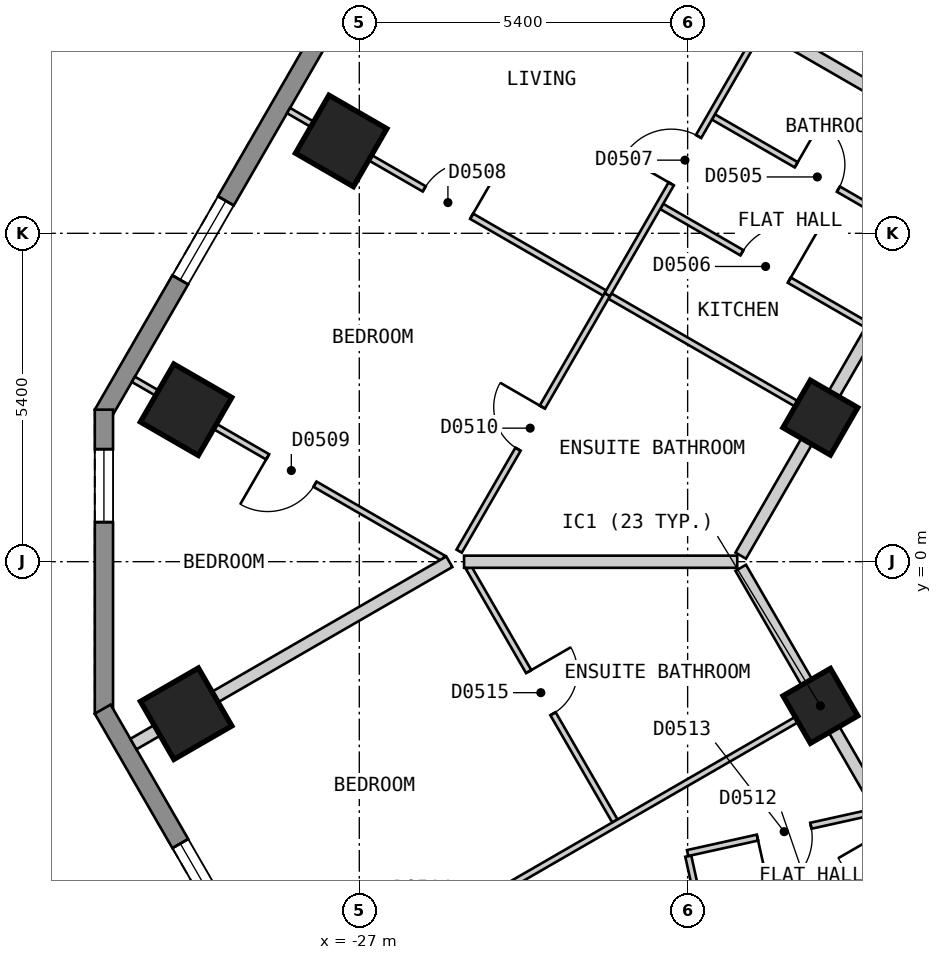
"""IFC4 building model, lengths in metres.
Left out: names, types, materials, properties, quantities, classifications, styles, units other than length and angle.
Written with IfcOpenShell. Run it as: python <this file> out.ifc"""

import sys

from ifc_helpers import new_model, si_unit, direction, frame, frame_2d, origin, origin_2d, place, context, subcontext, project, spatial, polyline, rectangle, outline, extrude, element, fill, save


model = new_model("IFC4")
c1 = context("Model", 3, precision=1e-05, world=origin(), true_north=direction((0.0, 1.0)))
c2 = subcontext(c1, "Body", "Model", "MODEL_VIEW")
j1 = project(units=[si_unit("LENGTHUNIT", "METRE"), si_unit("PLANEANGLEUNIT", "RADIAN")], contexts=[c1])
p1 = place(None, origin())
s1 = spatial("IfcSite", under=j1, at=p1, CompositionType="ELEMENT")
p2 = place(p1, origin())
s2 = spatial("IfcBuilding", under=s1, at=p2, CompositionType="ELEMENT")
p3 = place(p2, frame((0.0, 0.0, 50.4)))
s3 = spatial("IfcBuildingStorey", under=s2, at=p3, CompositionType="ELEMENT", Elevation=50.4)
for number, where, z_axis, x_axis in (
    (1, (-27.298, 6.919, 0.0), (0.0, 0.0, 1.0), (-0.5, -0.866, 0.0)),
    (2, (-29.849, 2.499, 0.0), (0.0, 0.0, 1.0), (-0.5, -0.866, 0.0)),
    (3, (-29.848, -2.5, 0.0), (0.0, 0.0, 1.0), (0.5, -0.866, 0.0)),
):
    element("IfcColumn", number, at=place(p3, frame(where, z_axis=z_axis, x_axis=x_axis)), inside=s3, PredefinedType="COLUMN", context=c2, shape_type="SweptSolid", body=[
        extrude(rectangle(XDim=1.1, YDim=1.1, at=origin_2d()), origin(), (0.0, 0.0, 1.0), 3.0),
    ])
for number, where, z_axis, x_axis in (
    (4, (-19.416, -2.371, 0.0), (0.0, 0.0, 1.0), (0.5, -0.866, 0.0)),
    (5, (-19.417, 2.369, 0.0), (0.0, 0.0, 1.0), (-0.5, -0.866, 0.0)),
):
    element("IfcColumn", number, at=place(p3, frame(where, z_axis=z_axis, x_axis=x_axis)), inside=s3, PredefinedType="COLUMN", context=c2, shape_type="SweptSolid", body=[
        extrude(rectangle(XDim=0.9, YDim=0.9, at=origin_2d()), origin(), (0.0, 0.0, 1.0), 3.0),
    ])
p4 = place(p3, frame((-17.71, 25.825, 0.0), z_axis=(0.0, 0.0, 1.0), x_axis=(-0.500001938803, -0.866024284413, 0.0)))
e6 = element("IfcWall", 6, at=p4, inside=s3, PredefinedType="SOLIDWALL", context=c2, shape_type="SweptSolid", body=[
    extrude(outline(polyline([(0.0, -0.15), (27.02, -0.15), (26.94, 0.15), (0.08, 0.15), (0.0, -0.15)])), origin(), (0.0, 0.0, 1.0), 2.7),
])
p5 = place(p4, frame((2.553, 0.0, 0.15)))
e7 = element("IfcOpeningElement", 7, at=p5, cuts=e6, PredefinedType="OPENING", context=c2, shape_type="SweptSolid", body=[
    extrude(rectangle(XDim=1.5, YDim=2.1, at=frame_2d((0.75, 1.05))), frame((0.0, 0.16, 0.0), z_axis=(0.0, -1.0, 0.0), x_axis=(1.0, 0.0, 0.0)), (0.0, 0.0, 1.0), 0.32),
])
p6 = place(p4, frame((7.658, 0.0, 0.15)))
e8 = element("IfcOpeningElement", 8, at=p6, cuts=e6, PredefinedType="OPENING", context=c2, shape_type="SweptSolid", body=[
    extrude(rectangle(XDim=1.5, YDim=2.1, at=frame_2d((0.75, 1.05))), frame((0.0, 0.16, 0.0), z_axis=(0.0, -1.0, 0.0), x_axis=(1.0, 0.0, 0.0)), (0.0, 0.0, 1.0), 0.32),
])
p7 = place(p4, frame((12.761, 0.0, 0.15)))
e9 = element("IfcOpeningElement", 9, at=p7, cuts=e6, PredefinedType="OPENING", context=c2, shape_type="SweptSolid", body=[
    extrude(rectangle(XDim=1.5, YDim=2.1, at=frame_2d((0.75, 1.05))), frame((0.0, 0.16, 0.0), z_axis=(0.0, -1.0, 0.0), x_axis=(1.0, 0.0, 0.0)), (0.0, 0.0, 1.0), 0.32),
])
p8 = place(p4, frame((17.865, 0.0, 0.15)))
e10 = element("IfcOpeningElement", 10, at=p8, cuts=e6, PredefinedType="OPENING", context=c2, shape_type="SweptSolid", body=[
    extrude(rectangle(XDim=1.5, YDim=2.1, at=frame_2d((0.75, 1.05))), frame((0.0, 0.16, 0.0), z_axis=(0.0, -1.0, 0.0), x_axis=(1.0, 0.0, 0.0)), (0.0, 0.0, 1.0), 0.32),
])
p9 = place(p4, frame((22.969, 0.0, 0.15)))
e11 = element("IfcOpeningElement", 11, at=p9, cuts=e6, PredefinedType="OPENING", context=c2, shape_type="SweptSolid", body=[
    extrude(rectangle(XDim=1.5, YDim=2.1, at=frame_2d((0.75, 1.05))), frame((0.0, 0.16, 0.0), z_axis=(0.0, -1.0, 0.0), x_axis=(1.0, 0.0, 0.0)), (0.0, 0.0, 1.0), 0.32),
])
p10 = place(p3, frame((-31.2, 2.5, 0.0), z_axis=(0.0, 0.0, 1.0), x_axis=(0.0, -1.0, 0.0)))
e12 = element("IfcWall", 12, at=p10, inside=s3, PredefinedType="SOLIDWALL", context=c2, shape_type="SweptSolid", body=[
    extrude(outline(polyline([(0.0, -0.15), (5.0, -0.15), (4.92, 0.15), (0.08, 0.15), (0.0, -0.15)])), origin(), (0.0, 0.0, 1.0), 2.7),
])
p11 = place(p10, frame((0.65, 0.0, 0.15)))
e13 = element("IfcOpeningElement", 13, at=p11, cuts=e12, PredefinedType="OPENING", context=c2, shape_type="SweptSolid", body=[
    extrude(rectangle(XDim=1.2, YDim=2.1, at=frame_2d((0.6, 1.05))), frame((0.0, 0.16, 0.0), z_axis=(0.0, -1.0, 0.0), x_axis=(1.0, 0.0, 0.0)), (0.0, 0.0, 1.0), 0.32),
])
p12 = place(p3, frame((-31.22, -2.425, 0.0), z_axis=(0.0, 0.0, 1.0), x_axis=(0.500001938803, -0.866024284413, 0.0)))
e14 = element("IfcWall", 14, at=p12, inside=s3, PredefinedType="SOLIDWALL", context=c2, shape_type="SweptSolid", body=[
    extrude(outline(polyline([(0.0, -0.15), (27.02, -0.15), (26.94, 0.15), (0.08, 0.15), (0.0, -0.15)])), origin(), (0.0, 0.0, 1.0), 2.7),
])
p13 = place(p12, frame((2.553, 0.0, 0.15)))
e15 = element("IfcOpeningElement", 15, at=p13, cuts=e14, PredefinedType="OPENING", context=c2, shape_type="SweptSolid", body=[
    extrude(rectangle(XDim=1.5, YDim=2.1, at=frame_2d((0.75, 1.05))), frame((0.0, 0.16, 0.0), z_axis=(0.0, -1.0, 0.0), x_axis=(1.0, 0.0, 0.0)), (0.0, 0.0, 1.0), 0.32),
])
p14 = place(p12, frame((7.657, 0.0, 0.15)))
e16 = element("IfcOpeningElement", 16, at=p14, cuts=e14, PredefinedType="OPENING", context=c2, shape_type="SweptSolid", body=[
    extrude(rectangle(XDim=1.5, YDim=2.1, at=frame_2d((0.75, 1.05))), frame((0.0, 0.16, 0.0), z_axis=(0.0, -1.0, 0.0), x_axis=(1.0, 0.0, 0.0)), (0.0, 0.0, 1.0), 0.32),
])
p15 = place(p12, frame((12.761, 0.0, 0.15)))
e17 = element("IfcOpeningElement", 17, at=p15, cuts=e14, PredefinedType="OPENING", context=c2, shape_type="SweptSolid", body=[
    extrude(rectangle(XDim=1.5, YDim=2.1, at=frame_2d((0.75, 1.05))), frame((0.0, 0.16, 0.0), z_axis=(0.0, -1.0, 0.0), x_axis=(1.0, 0.0, 0.0)), (0.0, 0.0, 1.0), 0.32),
])
p16 = place(p12, frame((17.865, 0.0, 0.15)))
e18 = element("IfcOpeningElement", 18, at=p16, cuts=e14, PredefinedType="OPENING", context=c2, shape_type="SweptSolid", body=[
    extrude(rectangle(XDim=1.5, YDim=2.1, at=frame_2d((0.75, 1.05))), frame((0.0, 0.16, 0.0), z_axis=(0.0, -1.0, 0.0), x_axis=(1.0, 0.0, 0.0)), (0.0, 0.0, 1.0), 0.32),
])
p17 = place(p12, frame((22.969, 0.0, 0.15)))
e19 = element("IfcOpeningElement", 19, at=p17, cuts=e14, PredefinedType="OPENING", context=c2, shape_type="SweptSolid", body=[
    extrude(rectangle(XDim=1.5, YDim=2.1, at=frame_2d((0.75, 1.05))), frame((0.0, 0.16, 0.0), z_axis=(0.0, -1.0, 0.0), x_axis=(1.0, 0.0, 0.0)), (0.0, 0.0, 1.0), 0.32),
])
p18 = place(p3, frame((-20.727, -0.101, 0.0), z_axis=(0.0, 0.0, 1.0), x_axis=(0.500065652488, -0.865987495984, 0.0)))
e20 = element("IfcWall", 20, at=p18, inside=s3, PredefinedType="PARTITIONING", context=c2, shape_type="SweptSolid", body=[
    extrude(rectangle(XDim=7.389, YDim=0.2, at=frame_2d((3.695, 0.0))), origin(), (0.0, 0.0, 1.0), 2.7),
])
p19 = place(p18, frame((4.937, 0.0, 0.0)))
e21 = element("IfcOpeningElement", 21, at=p19, cuts=e20, PredefinedType="OPENING", context=c2, shape_type="SweptSolid", body=[
    extrude(rectangle(XDim=1.0, YDim=2.1, at=frame_2d((0.5, 1.05))), frame((0.0, 0.11, 0.0), z_axis=(0.0, -1.0, 0.0), x_axis=(1.0, 0.0, 0.0)), (0.0, 0.0, 1.0), 0.22),
])
p20 = place(p3, frame((-20.727, 0.099, 0.0), z_axis=(0.0, 0.0, 1.0), x_axis=(0.499993204491, 0.866029327138, 0.0)))
e22 = element("IfcWall", 22, at=p20, inside=s3, PredefinedType="PARTITIONING", context=c2, shape_type="SweptSolid", body=[
    extrude(rectangle(XDim=20.554, YDim=0.2, at=frame_2d((10.277, 0.0))), origin(), (0.0, 0.0, 1.0), 2.7),
])
p21 = place(p20, frame((9.776, 0.0, 0.0)))
e23 = element("IfcOpeningElement", 23, at=p21, cuts=e22, PredefinedType="OPENING", context=c2, shape_type="SweptSolid", body=[
    extrude(rectangle(XDim=1.0, YDim=2.1, at=frame_2d((0.5, 1.05))), frame((0.0, 0.11, 0.0), z_axis=(0.0, -1.0, 0.0), x_axis=(1.0, 0.0, 0.0)), (0.0, 0.0, 1.0), 0.22),
])
p22 = place(p20, frame((4.673, 0.0, 0.0)))
e24 = element("IfcOpeningElement", 24, at=p22, cuts=e22, PredefinedType="OPENING", context=c2, shape_type="SweptSolid", body=[
    extrude(rectangle(XDim=1.0, YDim=2.1, at=frame_2d((0.5, 1.05))), frame((0.0, 0.11, 0.0), z_axis=(0.0, -1.0, 0.0), x_axis=(1.0, 0.0, 0.0)), (0.0, 0.0, 1.0), 0.22),
])
p23 = place(p20, frame((14.88, 0.0, 0.0)))
e25 = element("IfcOpeningElement", 25, at=p23, cuts=e22, PredefinedType="OPENING", context=c2, shape_type="SweptSolid", body=[
    extrude(rectangle(XDim=1.0, YDim=2.1, at=frame_2d((0.5, 1.05))), frame((0.0, 0.11, 0.0), z_axis=(0.0, -1.0, 0.0), x_axis=(1.0, 0.0, 0.0)), (0.0, 0.0, 1.0), 0.22),
])
p24 = place(p3, frame((-25.2, -0.101, 0.0), z_axis=(0.0, 0.0, 1.0), x_axis=(0.500099052605, -0.865968208183, 0.0)))
e26 = element("IfcWall", 26, at=p24, inside=s3, PredefinedType="PARTITIONING", context=c2, shape_type="SweptSolid", body=[
    extrude(rectangle(XDim=4.807, YDim=0.1, at=frame_2d((2.404, 0.0))), origin(), (0.0, 0.0, 1.0), 2.7),
])
p25 = place(p24, frame((1.971, 0.0, 0.0)))
e27 = element("IfcOpeningElement", 27, at=p25, cuts=e26, PredefinedType="OPENING", context=c2, shape_type="SweptSolid", body=[
    extrude(rectangle(XDim=0.8, YDim=2.1, at=frame_2d((0.4, 1.05))), frame((0.0, 0.06, 0.0), z_axis=(0.0, -1.0, 0.0), x_axis=(1.0, 0.0, 0.0)), (0.0, 0.0, 1.0), 0.12),
])
p26 = place(p3, frame((-21.59, -4.842, 0.0), z_axis=(0.0, 0.0, 1.0), x_axis=(0.216524734289, -0.976277132499, 0.0)))
e28 = element("IfcWall", 28, at=p26, inside=s3, PredefinedType="PARTITIONING", context=c2, shape_type="SweptSolid", body=[
    extrude(rectangle(XDim=3.377, YDim=0.1, at=frame_2d((1.688, 0.0))), origin(), (0.0, 0.0, 1.0), 2.7),
])
p27 = place(p3, frame((-21.177, 7.314, 0.0), z_axis=(0.0, 0.0, 1.0), x_axis=(0.865979019114, -0.500080332001, 0.0)))
e29 = element("IfcWall", 29, at=p27, inside=s3, PredefinedType="PARTITIONING", context=c2, shape_type="SweptSolid", body=[
    extrude(rectangle(XDim=3.897, YDim=0.1, at=frame_2d((1.949, 0.0))), origin(), (0.0, 0.0, 1.0), 2.7),
])
p28 = place(p27, frame((1.574, 0.0, 0.0)))
e30 = element("IfcOpeningElement", 30, at=p28, cuts=e29, PredefinedType="OPENING", context=c2, shape_type="SweptSolid", body=[
    extrude(rectangle(XDim=0.8, YDim=2.1, at=frame_2d((0.4, 1.05))), frame((0.0, 0.06, 0.0), z_axis=(0.0, -1.0, 0.0), x_axis=(1.0, 0.0, 0.0)), (0.0, 0.0, 1.0), 0.12),
])
p29 = place(p3, frame((-22.027, 5.842, 0.0), z_axis=(0.0, 0.0, 1.0), x_axis=(0.865979019114, -0.500080332001, 0.0)))
e31 = element("IfcWall", 31, at=p29, inside=s3, PredefinedType="PARTITIONING", context=c2, shape_type="SweptSolid", body=[
    extrude(rectangle(XDim=3.897, YDim=0.1, at=frame_2d((1.949, 0.0))), origin(), (0.0, 0.0, 1.0), 2.7),
])
p30 = place(p29, frame((1.524, 0.0, 0.0)))
e32 = element("IfcOpeningElement", 32, at=p30, cuts=e31, PredefinedType="OPENING", context=c2, shape_type="SweptSolid", body=[
    extrude(rectangle(XDim=0.9, YDim=2.1, at=frame_2d((0.45, 1.05))), frame((0.0, 0.06, 0.0), z_axis=(0.0, -1.0, 0.0), x_axis=(1.0, 0.0, 0.0)), (0.0, 0.0, 1.0), 0.12),
])
p31 = place(p3, frame((-28.164, 7.419, 0.0), z_axis=(0.0, 0.0, 1.0), x_axis=(0.866047370643, -0.499961950354, 0.0)))
e33 = element("IfcWall", 33, at=p31, inside=s3, PredefinedType="PARTITIONING", context=c2, shape_type="SweptSolid", body=[
    extrude(rectangle(XDim=10.001, YDim=0.1, at=frame_2d((5.0, 0.0))), origin(), (0.0, 0.0, 1.0), 2.7),
])
p32 = place(p31, frame((2.577, 0.0, 0.0)))
e34 = element("IfcOpeningElement", 34, at=p32, cuts=e33, PredefinedType="OPENING", context=c2, shape_type="SweptSolid", body=[
    extrude(rectangle(XDim=0.9, YDim=2.1, at=frame_2d((0.45, 1.05))), frame((0.0, 0.06, 0.0), z_axis=(0.0, -1.0, 0.0), x_axis=(1.0, 0.0, 0.0)), (0.0, 0.0, 1.0), 0.12),
])
p33 = place(p3, frame((-30.716, 2.999, 0.0), z_axis=(0.0, 0.0, 1.0), x_axis=(0.866025981722, -0.499998998981, 0.0)))
e35 = element("IfcWall", 35, at=p33, inside=s3, PredefinedType="PARTITIONING", context=c2, shape_type="SweptSolid", body=[
    extrude(rectangle(XDim=5.884, YDim=0.1, at=frame_2d((2.942, 0.0))), origin(), (0.0, 0.0, 1.0), 2.7),
])
p34 = place(p33, frame((2.55, 0.0, 0.0)))
e36 = element("IfcOpeningElement", 36, at=p34, cuts=e35, PredefinedType="OPENING", context=c2, shape_type="SweptSolid", body=[
    extrude(rectangle(XDim=0.9, YDim=2.1, at=frame_2d((0.45, 1.05))), frame((0.0, 0.06, 0.0), z_axis=(0.0, -1.0, 0.0), x_axis=(1.0, 0.0, 0.0)), (0.0, 0.0, 1.0), 0.12),
])
p35 = place(p3, frame((-25.358, 0.173, 0.0), z_axis=(0.0, 0.0, 1.0), x_axis=(0.500180754623, 0.8659210199, 0.0)))
e37 = element("IfcWall", 37, at=p35, inside=s3, PredefinedType="PARTITIONING", context=c2, shape_type="SweptSolid", body=[
    extrude(rectangle(XDim=4.872, YDim=0.1, at=frame_2d((2.436, 0.0))), origin(), (0.0, 0.0, 1.0), 2.7),
])
p36 = place(p35, frame((1.936, 0.0, 0.0)))
e38 = element("IfcOpeningElement", 38, at=p36, cuts=e37, PredefinedType="OPENING", context=c2, shape_type="SweptSolid", body=[
    extrude(rectangle(XDim=0.8, YDim=2.1, at=frame_2d((0.4, 1.05))), frame((0.0, 0.06, 0.0), z_axis=(0.0, -1.0, 0.0), x_axis=(1.0, 0.0, 0.0)), (0.0, 0.0, 1.0), 0.12),
])
p37 = place(p3, frame((-21.6, -4.792, 0.0), z_axis=(0.0, 0.0, 1.0), x_axis=(0.976320106661, 0.216330879278, 0.0)))
e39 = element("IfcWall", 39, at=p37, inside=s3, PredefinedType="PARTITIONING", context=c2, shape_type="SweptSolid", body=[
    extrude(rectangle(XDim=3.147, YDim=0.1, at=frame_2d((1.574, 0.0))), origin(), (0.0, 0.0, 1.0), 2.7),
])
p38 = place(p37, frame((1.176, 0.0, 0.0)))
e40 = element("IfcOpeningElement", 40, at=p38, cuts=e39, PredefinedType="OPENING", context=c2, shape_type="SweptSolid", body=[
    extrude(rectangle(XDim=0.9, YDim=2.1, at=frame_2d((0.45, 1.05))), frame((0.0, 0.06, 0.0), z_axis=(0.0, -1.0, 0.0), x_axis=(1.0, 0.0, 0.0)), (0.0, 0.0, 1.0), 0.12),
])
p39 = place(p3, frame((-28.163, -7.42, 0.0), z_axis=(0.0, 0.0, 1.0), x_axis=(0.866065245018, 0.499930986609, 0.0)))
e41 = element("IfcWall", 41, at=p39, inside=s3, PredefinedType="PARTITIONING", context=c2, shape_type="SweptSolid", body=[
    extrude(rectangle(XDim=10.0, YDim=0.1, at=frame_2d((5.0, 0.0))), origin(), (0.0, 0.0, 1.0), 2.7),
])
p40 = place(p39, frame((2.663, 0.0, 0.0)))
e42 = element("IfcOpeningElement", 42, at=p40, cuts=e41, PredefinedType="OPENING", context=c2, shape_type="SweptSolid", body=[
    extrude(rectangle(XDim=0.9, YDim=2.1, at=frame_2d((0.45, 1.05))), frame((0.0, 0.06, 0.0), z_axis=(0.0, -1.0, 0.0), x_axis=(1.0, 0.0, 0.0)), (0.0, 0.0, 1.0), 0.12),
])
p41 = place(p3, frame((-25.611, 11.839, 0.0), z_axis=(0.0, 0.0, 1.0), x_axis=(0.866022959057, -0.500004234368, 0.0)))
e43 = element("IfcWall", 43, at=p41, inside=s3, PredefinedType="PARTITIONING", context=c2, shape_type="SweptSolid", body=[
    extrude(rectangle(XDim=10.0, YDim=0.2, at=frame_2d((5.0, 0.0))), origin(), (0.0, 0.0, 1.0), 2.7),
])
p42 = place(p3, frame((-25.277, -0.001, 0.0), z_axis=(0.0, 0.0, 1.0), x_axis=(1.0, 0.0, 0.0)))
e44 = element("IfcWall", 44, at=p42, inside=s3, PredefinedType="PARTITIONING", context=c2, shape_type="SweptSolid", body=[
    extrude(rectangle(XDim=4.493, YDim=0.2, at=frame_2d((2.247, 0.0))), origin(), (0.0, 0.0, 1.0), 2.7),
])
p43 = place(p3, frame((-30.715, -3.0, 0.0), z_axis=(0.0, 0.0, 1.0), x_axis=(0.86609140076, 0.499885672459, 0.0)))
e45 = element("IfcWall", 45, at=p43, inside=s3, PredefinedType="PARTITIONING", context=c2, shape_type="SweptSolid", body=[
    extrude(rectangle(XDim=6.0, YDim=0.2, at=frame_2d((3.0, 0.0))), origin(), (0.0, 0.0, 1.0), 2.7),
])
p44 = place(p3, frame((-22.921, 4.392, 0.0), z_axis=(0.0, 0.0, 1.0), x_axis=(0.499958946799, 0.866049104564, 0.0)))
e46 = element("IfcWall", 46, at=p44, inside=s3, PredefinedType="PARTITIONING", context=c2, shape_type="SweptSolid", body=[
    extrude(rectangle(XDim=5.004, YDim=0.1, at=frame_2d((2.502, 0.0))), origin(), (0.0, 0.0, 1.0), 2.7),
])
p45 = place(p44, frame((2.103, 0.0, 0.0)))
e47 = element("IfcOpeningElement", 47, at=p45, cuts=e46, PredefinedType="OPENING", context=c2, shape_type="SweptSolid", body=[
    extrude(rectangle(XDim=0.9, YDim=2.1, at=frame_2d((0.45, 1.05))), frame((0.0, 0.06, 0.0), z_axis=(0.0, -1.0, 0.0), x_axis=(1.0, 0.0, 0.0)), (0.0, 0.0, 1.0), 0.12),
])
p46 = place(p9, origin())
e48 = element("IfcWindow", 48, at=p46, inside=s3, PartitioningType="SINGLE_PANEL", PredefinedType="WINDOW", context=c2, shape_type="SweptSolid", body=[
    extrude(rectangle(XDim=1.5, YDim=2.1, at=frame_2d((0.75, 1.05))), frame((0.0, 0.03, 0.0), z_axis=(0.0, -1.0, 0.0), x_axis=(1.0, 0.0, 0.0)), (0.0, 0.0, 1.0), 0.06),
])
fill(e11, e48)
p47 = place(p11, origin())
e49 = element("IfcWindow", 49, at=p47, inside=s3, PartitioningType="SINGLE_PANEL", PredefinedType="WINDOW", context=c2, shape_type="SweptSolid", body=[
    extrude(rectangle(XDim=1.2, YDim=2.1, at=frame_2d((0.6, 1.05))), frame((0.0, 0.03, 0.0), z_axis=(0.0, -1.0, 0.0), x_axis=(1.0, 0.0, 0.0)), (0.0, 0.0, 1.0), 0.06),
])
fill(e13, e49)
p48 = place(p13, origin())
e50 = element("IfcWindow", 50, at=p48, inside=s3, PartitioningType="SINGLE_PANEL", PredefinedType="WINDOW", context=c2, shape_type="SweptSolid", body=[
    extrude(rectangle(XDim=1.5, YDim=2.1, at=frame_2d((0.75, 1.05))), frame((0.0, 0.03, 0.0), z_axis=(0.0, -1.0, 0.0), x_axis=(1.0, 0.0, 0.0)), (0.0, 0.0, 1.0), 0.06),
])
fill(e15, e50)
p49 = place(p28, origin())
e51 = element("IfcDoor", 51, at=p49, inside=s3, OperationType="SINGLE_SWING_LEFT", PredefinedType="DOOR", context=c2, shape_type="SweptSolid", body=[
    extrude(rectangle(XDim=0.8, YDim=2.1, at=frame_2d((0.4, 1.05))), frame((0.0, 0.025, 0.0), z_axis=(0.0, -1.0, 0.0), x_axis=(1.0, 0.0, 0.0)), (0.0, 0.0, 1.0), 0.05),
])
fill(e30, e51)
p50 = place(p30, origin())
e52 = element("IfcDoor", 52, at=p50, inside=s3, OperationType="SINGLE_SWING_RIGHT", PredefinedType="DOOR", context=c2, shape_type="SweptSolid", body=[
    extrude(rectangle(XDim=0.9, YDim=2.1, at=frame_2d((0.45, 1.05))), frame((0.0, 0.025, 0.0), z_axis=(0.0, -1.0, 0.0), x_axis=(1.0, 0.0, 0.0)), (0.0, 0.0, 1.0), 0.05),
])
fill(e32, e52)
p51 = place(p45, origin())
e53 = element("IfcDoor", 53, at=p51, inside=s3, OperationType="SINGLE_SWING_LEFT", PredefinedType="DOOR", context=c2, shape_type="SweptSolid", body=[
    extrude(rectangle(XDim=0.9, YDim=2.1, at=frame_2d((0.45, 1.05))), frame((0.0, 0.025, 0.0), z_axis=(0.0, -1.0, 0.0), x_axis=(1.0, 0.0, 0.0)), (0.0, 0.0, 1.0), 0.05),
])
fill(e47, e53)
p52 = place(p32, origin())
e54 = element("IfcDoor", 54, at=p52, inside=s3, OperationType="SINGLE_SWING_RIGHT", PredefinedType="DOOR", context=c2, shape_type="SweptSolid", body=[
    extrude(rectangle(XDim=0.9, YDim=2.1, at=frame_2d((0.45, 1.05))), frame((0.0, 0.025, 0.0), z_axis=(0.0, -1.0, 0.0), x_axis=(1.0, 0.0, 0.0)), (0.0, 0.0, 1.0), 0.05),
])
fill(e34, e54)
p53 = place(p34, origin())
e55 = element("IfcDoor", 55, at=p53, inside=s3, OperationType="SINGLE_SWING_LEFT", PredefinedType="DOOR", context=c2, shape_type="SweptSolid", body=[
    extrude(rectangle(XDim=0.9, YDim=2.1, at=frame_2d((0.45, 1.05))), frame((0.0, 0.025, 0.0), z_axis=(0.0, -1.0, 0.0), x_axis=(1.0, 0.0, 0.0)), (0.0, 0.0, 1.0), 0.05),
])
fill(e36, e55)
p54 = place(p36, origin())
e56 = element("IfcDoor", 56, at=p54, inside=s3, OperationType="SINGLE_SWING_RIGHT", PredefinedType="DOOR", context=c2, shape_type="SweptSolid", body=[
    extrude(rectangle(XDim=0.8, YDim=2.1, at=frame_2d((0.4, 1.05))), frame((0.0, 0.025, 0.0), z_axis=(0.0, -1.0, 0.0), x_axis=(1.0, 0.0, 0.0)), (0.0, 0.0, 1.0), 0.05),
])
fill(e38, e56)
p55 = place(p38, origin())
e57 = element("IfcDoor", 57, at=p55, inside=s3, OperationType="SINGLE_SWING_LEFT", PredefinedType="DOOR", context=c2, shape_type="SweptSolid", body=[
    extrude(rectangle(XDim=0.9, YDim=2.1, at=frame_2d((0.45, 1.05))), frame((0.0, 0.025, 0.0), z_axis=(0.0, -1.0, 0.0), x_axis=(1.0, 0.0, 0.0)), (0.0, 0.0, 1.0), 0.05),
])
fill(e40, e57)
p56 = place(p25, origin())
e58 = element("IfcDoor", 58, at=p56, inside=s3, OperationType="SINGLE_SWING_LEFT", PredefinedType="DOOR", context=c2, shape_type="SweptSolid", body=[
    extrude(rectangle(XDim=0.8, YDim=2.1, at=frame_2d((0.4, 1.05))), frame((0.0, 0.025, 0.0), z_axis=(0.0, -1.0, 0.0), x_axis=(1.0, 0.0, 0.0)), (0.0, 0.0, 1.0), 0.05),
])
fill(e27, e58)
save(model, sys.argv[1])
